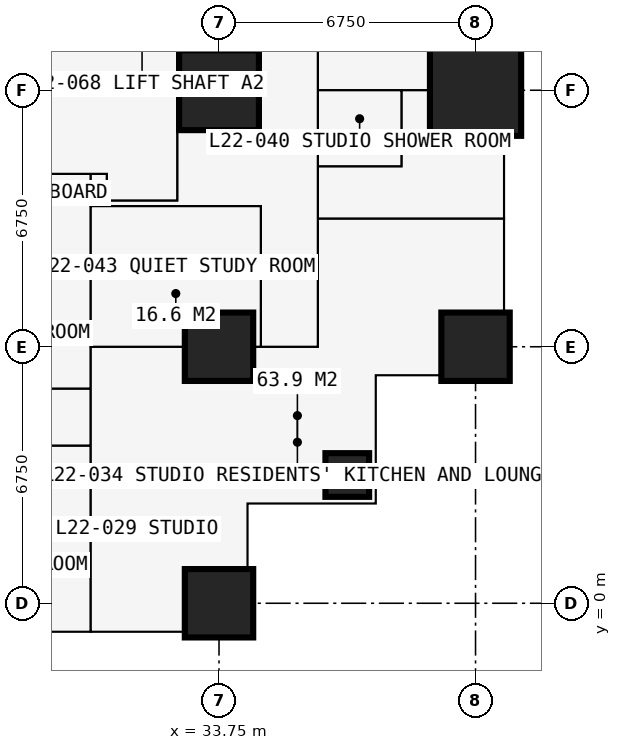
"""IFC4 building model, lengths in metres.
Left out: names, types, materials, properties, quantities, classifications, styles, units other than length and angle.
Written with IfcOpenShell. Run it as: python <this file> out.ifc"""

import sys

from ifc_helpers import new_model, si_unit, direction, frame, frame_2d, origin, origin_2d, place, context, subcontext, project, spatial, rectangle, extrude, element, fill, save


model = new_model("IFC4")
c1 = context("Model", 3, precision=1e-05, world=origin(), true_north=direction((0.0, 1.0)))
c2 = subcontext(c1, "Body", "Model", "MODEL_VIEW")
j1 = project(units=[si_unit("LENGTHUNIT", "METRE"), si_unit("PLANEANGLEUNIT", "RADIAN")], contexts=[c1])
p1 = place(None, origin())
s1 = spatial("IfcSite", under=j1, at=p1, CompositionType="ELEMENT")
p2 = place(p1, origin())
s2 = spatial("IfcBuilding", under=s1, at=p2, CompositionType="ELEMENT")
p3 = place(p2, frame((0.0, 0.0, 83.7)))
s3 = spatial("IfcBuildingStorey", under=s2, at=p3, CompositionType="ELEMENT", Elevation=83.7)
for number, where, z_axis, x_axis in (
    (1, (33.75, 0.0, 0.0), (0.0, 0.0, 1.0), (1.0, 0.0, 0.0)),
    (2, (33.75, 6.75, 0.0), (0.0, 0.0, 1.0), (1.0, 0.0, 0.0)),
):
    element("IfcColumn", number, at=place(p3, frame(where, z_axis=z_axis, x_axis=x_axis)), inside=s3, PredefinedType="COLUMN", context=c2, shape_type="SweptSolid", body=[
        extrude(rectangle(XDim=1.8, YDim=1.8, at=origin_2d()), origin(), (0.0, 0.0, 1.0), 3.6),
    ])
p4 = place(p3, frame((33.75, 13.5, 0.0), z_axis=(0.0, 0.0, 1.0), x_axis=(1.0, 0.0, 0.0)))
e3 = element("IfcColumn", 3, at=p4, inside=s3, PredefinedType="COLUMN", context=c2, shape_type="SweptSolid", body=[
    extrude(rectangle(XDim=2.1, YDim=2.1, at=origin_2d()), origin(), (0.0, 0.0, 1.0), 3.6),
])
p5 = place(p3, frame((37.125, 3.375, 0.0), z_axis=(0.0, 0.0, 1.0), x_axis=(1.0, 0.0, 0.0)))
e4 = element("IfcColumn", 4, at=p5, inside=s3, PredefinedType="COLUMN", context=c2, shape_type="SweptSolid", body=[
    extrude(rectangle(XDim=1.15, YDim=1.15, at=origin_2d()), origin(), (0.0, 0.0, 1.0), 3.6),
])
p6 = place(p3, frame((40.5, 6.75, 0.0), z_axis=(0.0, 0.0, 1.0), x_axis=(1.0, 0.0, 0.0)))
e5 = element("IfcColumn", 5, at=p6, inside=s3, PredefinedType="COLUMN", context=c2, shape_type="SweptSolid", body=[
    extrude(rectangle(XDim=1.8, YDim=1.8, at=origin_2d()), origin(), (0.0, 0.0, 1.0), 3.6),
])
p7 = place(p3, frame((40.5, 13.5, 0.0), z_axis=(0.0, 0.0, 1.0), x_axis=(1.0, 0.0, 0.0)))
e6 = element("IfcColumn", 6, at=p7, inside=s3, PredefinedType="COLUMN", context=c2, shape_type="SweptSolid", body=[
    extrude(rectangle(XDim=2.4, YDim=2.4, at=origin_2d()), origin(), (0.0, 0.0, 1.0), 3.6),
])
p8 = place(p3, frame((34.5, -0.75, 0.0), z_axis=(0.0, 0.0, 1.0), x_axis=(0.0, 1.0, 0.0)))
e7 = element("IfcWall", 7, at=p8, inside=s3, PredefinedType="SOLIDWALL", context=c2, shape_type="SweptSolid", body=[
    extrude(rectangle(XDim=3.375, YDim=0.3, at=frame_2d((1.688, 0.0))), origin(), (0.0, 0.0, 1.0), 3.375),
])
p9 = place(p8, frame((1.833, 0.0, 0.9)))
e8 = element("IfcOpeningElement", 8, at=p9, cuts=e7, PredefinedType="OPENING", context=c2, shape_type="SweptSolid", body=[
    extrude(rectangle(XDim=1.2, YDim=1.8, at=frame_2d((0.6, 0.9))), frame((0.0, 0.16, 0.0), z_axis=(0.0, -1.0, 0.0), x_axis=(1.0, 0.0, 0.0)), (0.0, 0.0, 1.0), 0.32),
])
p10 = place(p3, frame((34.5, 2.625, 0.0), z_axis=(0.0, 0.0, 1.0), x_axis=(1.0, 0.0, 0.0)))
e9 = element("IfcWall", 9, at=p10, inside=s3, PredefinedType="SOLIDWALL", context=c2, shape_type="SweptSolid", body=[
    extrude(rectangle(XDim=3.375, YDim=0.3, at=frame_2d((1.688, 0.0))), origin(), (0.0, 0.0, 1.0), 3.375),
])
p11 = place(p10, frame((0.788, 0.0, 0.6)))
e10 = element("IfcOpeningElement", 10, at=p11, cuts=e9, PredefinedType="OPENING", context=c2, shape_type="SweptSolid", body=[
    extrude(rectangle(XDim=1.8, YDim=2.1, at=frame_2d((0.9, 1.05))), frame((0.0, 0.16, 0.0), z_axis=(0.0, -1.0, 0.0), x_axis=(1.0, 0.0, 0.0)), (0.0, 0.0, 1.0), 0.32),
])
p12 = place(p3, frame((37.875, 2.625, 0.0), z_axis=(0.0, 0.0, 1.0), x_axis=(0.0, 1.0, 0.0)))
e11 = element("IfcWall", 11, at=p12, inside=s3, PredefinedType="SOLIDWALL", context=c2, shape_type="SweptSolid", body=[
    extrude(rectangle(XDim=3.375, YDim=0.3, at=frame_2d((1.688, 0.0))), origin(), (0.0, 0.0, 1.0), 3.375),
])
p13 = place(p12, frame((0.788, 0.0, 0.6)))
e12 = element("IfcOpeningElement", 12, at=p13, cuts=e11, PredefinedType="OPENING", context=c2, shape_type="SweptSolid", body=[
    extrude(rectangle(XDim=1.8, YDim=2.1, at=frame_2d((0.9, 1.05))), frame((0.0, 0.16, 0.0), z_axis=(0.0, -1.0, 0.0), x_axis=(1.0, 0.0, 0.0)), (0.0, 0.0, 1.0), 0.32),
])
p14 = place(p3, frame((37.875, 6.0, 0.0), z_axis=(0.0, 0.0, 1.0), x_axis=(1.0, 0.0, 0.0)))
e13 = element("IfcWall", 13, at=p14, inside=s3, PredefinedType="SOLIDWALL", context=c2, shape_type="SweptSolid", body=[
    extrude(rectangle(XDim=3.375, YDim=0.3, at=frame_2d((1.688, 0.0))), origin(), (0.0, 0.0, 1.0), 3.375),
])
p15 = place(p14, frame((0.343, 0.0, 0.9)))
e14 = element("IfcOpeningElement", 14, at=p15, cuts=e13, PredefinedType="OPENING", context=c2, shape_type="SweptSolid", body=[
    extrude(rectangle(XDim=1.2, YDim=1.8, at=frame_2d((0.6, 0.9))), frame((0.0, 0.16, 0.0), z_axis=(0.0, -1.0, 0.0), x_axis=(1.0, 0.0, 0.0)), (0.0, 0.0, 1.0), 0.32),
])
p16 = place(p3, frame((6.75, 4.15, 0.0), z_axis=(0.0, 0.0, 1.0), x_axis=(1.0, 0.0, 0.0)))
e15 = element("IfcWall", 15, at=p16, inside=s3, PredefinedType="PARTITIONING", context=c2, shape_type="SweptSolid", body=[
    extrude(rectangle(XDim=23.625, YDim=0.1, at=frame_2d((11.812, 0.0))), origin(), (0.0, 0.0, 1.0), 3.375),
])
p17 = place(p16, frame((0.2, 0.0, 0.0)))
e16 = element("IfcOpeningElement", 16, at=p17, cuts=e15, PredefinedType="OPENING", context=c2, shape_type="SweptSolid", body=[
    extrude(rectangle(XDim=0.95, YDim=2.2, at=frame_2d((0.475, 1.1))), frame((0.0, 0.06, 0.0), z_axis=(0.0, -1.0, 0.0), x_axis=(1.0, 0.0, 0.0)), (0.0, 0.0, 1.0), 0.12),
])
p18 = place(p16, frame((3.625, 0.0, 0.0)))
e17 = element("IfcOpeningElement", 17, at=p18, cuts=e15, PredefinedType="OPENING", context=c2, shape_type="SweptSolid", body=[
    extrude(rectangle(XDim=0.95, YDim=2.2, at=frame_2d((0.475, 1.1))), frame((0.0, 0.06, 0.0), z_axis=(0.0, -1.0, 0.0), x_axis=(1.0, 0.0, 0.0)), (0.0, 0.0, 1.0), 0.12),
])
p19 = place(p16, frame((7.0, 0.0, 0.0)))
e18 = element("IfcOpeningElement", 18, at=p19, cuts=e15, PredefinedType="OPENING", context=c2, shape_type="SweptSolid", body=[
    extrude(rectangle(XDim=0.95, YDim=2.2, at=frame_2d((0.475, 1.1))), frame((0.0, 0.06, 0.0), z_axis=(0.0, -1.0, 0.0), x_axis=(1.0, 0.0, 0.0)), (0.0, 0.0, 1.0), 0.12),
])
p20 = place(p16, frame((10.375, 0.0, 0.0)))
e19 = element("IfcOpeningElement", 19, at=p20, cuts=e15, PredefinedType="OPENING", context=c2, shape_type="SweptSolid", body=[
    extrude(rectangle(XDim=0.95, YDim=2.2, at=frame_2d((0.475, 1.1))), frame((0.0, 0.06, 0.0), z_axis=(0.0, -1.0, 0.0), x_axis=(1.0, 0.0, 0.0)), (0.0, 0.0, 1.0), 0.12),
])
p21 = place(p16, frame((15.1, 0.0, 0.0)))
e20 = element("IfcOpeningElement", 20, at=p21, cuts=e15, PredefinedType="OPENING", context=c2, shape_type="SweptSolid", body=[
    extrude(rectangle(XDim=0.95, YDim=2.2, at=frame_2d((0.475, 1.1))), frame((0.0, 0.06, 0.0), z_axis=(0.0, -1.0, 0.0), x_axis=(1.0, 0.0, 0.0)), (0.0, 0.0, 1.0), 0.12),
])
p22 = place(p16, frame((20.5, 0.0, 0.0)))
e21 = element("IfcOpeningElement", 21, at=p22, cuts=e15, PredefinedType="OPENING", context=c2, shape_type="SweptSolid", body=[
    extrude(rectangle(XDim=0.95, YDim=2.2, at=frame_2d((0.475, 1.1))), frame((0.0, 0.06, 0.0), z_axis=(0.0, -1.0, 0.0), x_axis=(1.0, 0.0, 0.0)), (0.0, 0.0, 1.0), 0.12),
])
p23 = place(p3, frame((10.125, 11.3, 0.0), z_axis=(0.0, 0.0, 1.0), x_axis=(1.0, 0.0, 0.0)))
e22 = element("IfcWall", 22, at=p23, inside=s3, PredefinedType="PARTITIONING", context=c2, shape_type="SweptSolid", body=[
    extrude(rectangle(XDim=20.675, YDim=0.15, at=frame_2d((10.337, 0.0))), origin(), (0.0, 0.0, 1.0), 3.375),
])
p24 = place(p23, frame((8.375, 0.0, 0.0)))
e23 = element("IfcOpeningElement", 23, at=p24, cuts=e22, PredefinedType="OPENING", context=c2, shape_type="SweptSolid", body=[
    extrude(rectangle(XDim=1.0, YDim=2.2, at=frame_2d((0.5, 1.1))), frame((0.0, 0.085, 0.0), z_axis=(0.0, -1.0, 0.0), x_axis=(1.0, 0.0, 0.0)), (0.0, 0.0, 1.0), 0.17),
])
p25 = place(p23, frame((10.975, 0.0, 0.0)))
e24 = element("IfcOpeningElement", 24, at=p25, cuts=e22, PredefinedType="OPENING", context=c2, shape_type="SweptSolid", body=[
    extrude(rectangle(XDim=1.0, YDim=2.2, at=frame_2d((0.5, 1.1))), frame((0.0, 0.085, 0.0), z_axis=(0.0, -1.0, 0.0), x_axis=(1.0, 0.0, 0.0)), (0.0, 0.0, 1.0), 0.17),
])
p26 = place(p23, frame((3.925, 0.0, 0.0)))
e25 = element("IfcOpeningElement", 25, at=p26, cuts=e22, PredefinedType="OPENING", context=c2, shape_type="SweptSolid", body=[
    extrude(rectangle(XDim=0.95, YDim=2.2, at=frame_2d((0.475, 1.1))), frame((0.0, 0.085, 0.0), z_axis=(0.0, -1.0, 0.0), x_axis=(1.0, 0.0, 0.0)), (0.0, 0.0, 1.0), 0.17),
])
p27 = place(p3, frame((22.988, 5.65, 0.0), z_axis=(0.0, 0.0, 1.0), x_axis=(1.0, 0.0, 0.0)))
e26 = element("IfcWall", 26, at=p27, inside=s3, PredefinedType="PARTITIONING", context=c2, shape_type="SweptSolid", body=[
    extrude(rectangle(XDim=7.387, YDim=0.15, at=frame_2d((3.694, 0.0))), origin(), (0.0, 0.0, 1.0), 3.375),
])
p28 = place(p27, frame((2.0, 0.0, 0.0)))
e27 = element("IfcOpeningElement", 27, at=p28, cuts=e26, PredefinedType="OPENING", context=c2, shape_type="SweptSolid", body=[
    extrude(rectangle(XDim=0.95, YDim=2.2, at=frame_2d((0.475, 1.1))), frame((0.0, 0.085, 0.0), z_axis=(0.0, -1.0, 0.0), x_axis=(1.0, 0.0, 0.0)), (0.0, 0.0, 1.0), 0.17),
])
p29 = place(p3, frame((28.375, 1.95, 0.0), z_axis=(0.0, 0.0, 1.0), x_axis=(1.0, 0.0, 0.0)))
e28 = element("IfcWall", 28, at=p29, inside=s3, PredefinedType="PARTITIONING", context=c2, shape_type="SweptSolid", body=[
    extrude(rectangle(XDim=2.0, YDim=0.1, at=frame_2d((1.0, 0.0))), origin(), (0.0, 0.0, 1.0), 3.375),
])
p30 = place(p3, frame((30.375, -0.734, 0.0), z_axis=(0.0, 0.0, 1.0), x_axis=(0.0, 1.0, 0.0)))
e29 = element("IfcWall", 29, at=p30, inside=s3, PredefinedType="PARTITIONING", context=c2, shape_type="SweptSolid", body=[
    extrude(rectangle(XDim=12.034, YDim=0.15, at=frame_2d((6.017, 0.0))), origin(), (0.0, 0.0, 1.0), 3.375),
])
p31 = place(p30, frame((5.134, 0.0, 0.0)))
e30 = element("IfcOpeningElement", 30, at=p31, cuts=e29, PredefinedType="OPENING", context=c2, shape_type="SweptSolid", body=[
    extrude(rectangle(XDim=1.0, YDim=2.2, at=frame_2d((0.5, 1.1))), frame((0.0, 0.085, 0.0), z_axis=(0.0, -1.0, 0.0), x_axis=(1.0, 0.0, 0.0)), (0.0, 0.0, 1.0), 0.17),
])
p32 = place(p3, frame((30.375, 6.75, 0.0), z_axis=(0.0, 0.0, 1.0), x_axis=(1.0, 0.0, 0.0)))
e31 = element("IfcWall", 31, at=p32, inside=s3, PredefinedType="PARTITIONING", context=c2, shape_type="SweptSolid", body=[
    extrude(rectangle(XDim=5.975, YDim=0.15, at=frame_2d((2.988, 0.0))), origin(), (0.0, 0.0, 1.0), 2.877),
])
p33 = place(p3, frame((30.375, 10.45, 0.0), z_axis=(0.0, 0.0, 1.0), x_axis=(1.0, 0.0, 0.0)))
e32 = element("IfcWall", 32, at=p33, inside=s3, PredefinedType="PARTITIONING", context=c2, shape_type="SweptSolid", body=[
    extrude(rectangle(XDim=4.475, YDim=0.15, at=frame_2d((2.238, 0.0))), origin(), (0.0, 0.0, 1.0), 3.375),
])
p34 = place(p33, frame((2.35, 0.0, 0.0)))
e33 = element("IfcOpeningElement", 33, at=p34, cuts=e32, PredefinedType="OPENING", context=c2, shape_type="SweptSolid", body=[
    extrude(rectangle(XDim=0.95, YDim=2.2, at=frame_2d((0.475, 1.1))), frame((0.0, 0.085, 0.0), z_axis=(0.0, -1.0, 0.0), x_axis=(1.0, 0.0, 0.0)), (0.0, 0.0, 1.0), 0.17),
])
p35 = place(p3, frame((30.8, 10.6, 0.0), z_axis=(0.0, 0.0, 1.0), x_axis=(0.0, 1.0, 0.0)))
e34 = element("IfcWall", 34, at=p35, inside=s3, PredefinedType="PARTITIONING", context=c2, shape_type="SweptSolid", body=[
    extrude(rectangle(XDim=0.7, YDim=0.15, at=frame_2d((0.35, 0.0))), origin(), (0.0, 0.0, 1.0), 3.375),
])
p36 = place(p3, frame((30.8, 10.6, 0.0), z_axis=(0.0, 0.0, 1.0), x_axis=(1.0, 0.0, 0.0)))
e35 = element("IfcWall", 35, at=p36, inside=s3, PredefinedType="PARTITIONING", context=c2, shape_type="SweptSolid", body=[
    extrude(rectangle(XDim=1.85, YDim=0.15, at=frame_2d((0.925, 0.0))), origin(), (0.0, 0.0, 1.0), 3.375),
])
p37 = place(p3, frame((32.65, 10.6, 0.0), z_axis=(0.0, 0.0, 1.0), x_axis=(0.0, 1.0, 0.0)))
e36 = element("IfcWall", 36, at=p37, inside=s3, PredefinedType="SHEAR", context=c2, shape_type="SweptSolid", body=[
    extrude(rectangle(XDim=9.3, YDim=0.1, at=frame_2d((4.65, 0.0))), origin(), (0.0, 0.0, 1.0), 3.375),
])
p38 = place(p37, frame((0.5, 0.0, 0.0)))
e37 = element("IfcOpeningElement", 37, at=p38, cuts=e36, PredefinedType="OPENING", context=c2, shape_type="SweptSolid", body=[
    extrude(rectangle(XDim=1.0, YDim=2.2, at=frame_2d((0.5, 1.1))), frame((0.0, 0.06, 0.0), z_axis=(0.0, -1.0, 0.0), x_axis=(1.0, 0.0, 0.0)), (0.0, 0.0, 1.0), 0.12),
])
p39 = place(p3, frame((32.65, 12.55, 0.0), z_axis=(0.0, 0.0, 1.0), x_axis=(1.0, 0.0, 0.0)))
e38 = element("IfcWall", 38, at=p39, inside=s3, PredefinedType="PARTITIONING", context=c2, shape_type="SweptSolid", body=[
    extrude(rectangle(XDim=2.2, YDim=0.15, at=frame_2d((1.1, 0.0))), origin(), (0.0, 0.0, 1.0), 3.375),
])
p40 = place(p3, frame((34.85, 6.75, 0.0), z_axis=(0.0, 0.0, 1.0), x_axis=(0.0, 1.0, 0.0)))
e39 = element("IfcWall", 39, at=p40, inside=s3, PredefinedType="PARTITIONING", context=c2, shape_type="SweptSolid", body=[
    extrude(rectangle(XDim=3.7, YDim=0.15, at=frame_2d((1.85, 0.0))), origin(), (0.0, 0.0, 1.0), 3.375),
])
p41 = place(p3, frame((34.85, 12.55, 0.0), z_axis=(0.0, 0.0, 1.0), x_axis=(0.0, 1.0, 0.0)))
e40 = element("IfcWall", 40, at=p41, inside=s3, PredefinedType="PARTITIONING", context=c2, shape_type="SweptSolid", body=[
    extrude(rectangle(XDim=17.825, YDim=0.15, at=frame_2d((8.913, 0.0))), origin(), (0.0, 0.0, 1.0), 3.375),
])
p42 = place(p41, frame((8.6, 0.0, 0.0)))
e41 = element("IfcOpeningElement", 41, at=p42, cuts=e40, PredefinedType="OPENING", context=c2, shape_type="SweptSolid", body=[
    extrude(rectangle(XDim=0.95, YDim=2.2, at=frame_2d((0.475, 1.1))), frame((0.0, 0.085, 0.0), z_axis=(0.0, -1.0, 0.0), x_axis=(1.0, 0.0, 0.0)), (0.0, 0.0, 1.0), 0.17),
])
p43 = place(p3, frame((36.35, 6.75, 0.0), z_axis=(0.0, 0.0, 1.0), x_axis=(0.0, 1.0, 0.0)))
e42 = element("IfcWall", 42, at=p43, inside=s3, PredefinedType="PARTITIONING", context=c2, shape_type="SweptSolid", body=[
    extrude(rectangle(XDim=20.25, YDim=0.15, at=frame_2d((10.125, 0.0))), origin(), (0.0, 0.0, 1.0), 3.375),
])
p44 = place(p43, frame((15.1, 0.0, 0.0)))
e43 = element("IfcOpeningElement", 43, at=p44, cuts=e42, PredefinedType="OPENING", context=c2, shape_type="SweptSolid", body=[
    extrude(rectangle(XDim=0.95, YDim=2.2, at=frame_2d((0.475, 1.1))), frame((0.0, 0.085, 0.0), z_axis=(0.0, -1.0, 0.0), x_axis=(1.0, 0.0, 0.0)), (0.0, 0.0, 1.0), 0.17),
])
p45 = place(p43, frame((8.35, 0.0, 0.0)))
e44 = element("IfcOpeningElement", 44, at=p45, cuts=e42, PredefinedType="OPENING", context=c2, shape_type="SweptSolid", body=[
    extrude(rectangle(XDim=0.95, YDim=2.2, at=frame_2d((0.475, 1.1))), frame((0.0, 0.085, 0.0), z_axis=(0.0, -1.0, 0.0), x_axis=(1.0, 0.0, 0.0)), (0.0, 0.0, 1.0), 0.17),
])
p46 = place(p43, frame((3.575, 0.0, 0.0)))
e45 = element("IfcOpeningElement", 45, at=p46, cuts=e42, PredefinedType="OPENING", context=c2, shape_type="SweptSolid", body=[
    extrude(rectangle(XDim=0.95, YDim=2.2, at=frame_2d((0.475, 1.1))), frame((0.0, 0.085, 0.0), z_axis=(0.0, -1.0, 0.0), x_axis=(1.0, 0.0, 0.0)), (0.0, 0.0, 1.0), 0.17),
])
p47 = place(p3, frame((36.35, 10.125, 0.0), z_axis=(0.0, 0.0, 1.0), x_axis=(1.0, 0.0, 0.0)))
e46 = element("IfcWall", 46, at=p47, inside=s3, PredefinedType="PARTITIONING", context=c2, shape_type="SweptSolid", body=[
    extrude(rectangle(XDim=4.884, YDim=0.15, at=frame_2d((2.442, 0.0))), origin(), (0.0, 0.0, 1.0), 3.375),
])
p48 = place(p3, frame((36.35, 11.5, 0.0), z_axis=(0.0, 0.0, 1.0), x_axis=(1.0, 0.0, 0.0)))
e47 = element("IfcWall", 47, at=p48, inside=s3, PredefinedType="PARTITIONING", context=c2, shape_type="SweptSolid", body=[
    extrude(rectangle(XDim=2.2, YDim=0.1, at=frame_2d((1.1, 0.0))), origin(), (0.0, 0.0, 1.0), 3.375),
])
p49 = place(p3, frame((36.35, 13.5, 0.0), z_axis=(0.0, 0.0, 1.0), x_axis=(1.0, 0.0, 0.0)))
e48 = element("IfcWall", 48, at=p49, inside=s3, PredefinedType="PARTITIONING", context=c2, shape_type="SweptSolid", body=[
    extrude(rectangle(XDim=4.884, YDim=0.175, at=frame_2d((2.442, 0.0))), origin(), (0.0, 0.0, 1.0), 2.61),
])
p50 = place(p49, frame((0.65, 0.0, 0.0)))
e49 = element("IfcOpeningElement", 49, at=p50, cuts=e48, PredefinedType="OPENING", context=c2, shape_type="SweptSolid", body=[
    extrude(rectangle(XDim=0.9, YDim=2.2, at=frame_2d((0.45, 1.1))), frame((0.0, 0.097, 0.0), z_axis=(0.0, -1.0, 0.0), x_axis=(1.0, 0.0, 0.0)), (0.0, 0.0, 1.0), 0.195),
])
p51 = place(p3, frame((38.55, 11.5, 0.0), z_axis=(0.0, 0.0, 1.0), x_axis=(0.0, 1.0, 0.0)))
e50 = element("IfcWall", 50, at=p51, inside=s3, PredefinedType="PARTITIONING", context=c2, shape_type="SweptSolid", body=[
    extrude(rectangle(XDim=2.0, YDim=0.1, at=frame_2d((1.0, 0.0))), origin(), (0.0, 0.0, 1.0), 3.375),
])
p52 = place(p9, origin())
e51 = element("IfcWindow", 51, at=p52, inside=s3, PartitioningType="SINGLE_PANEL", PredefinedType="WINDOW", context=c2, shape_type="SweptSolid", body=[
    extrude(rectangle(XDim=1.2, YDim=1.8, at=frame_2d((0.6, 0.9))), frame((0.0, 0.03, 0.0), z_axis=(0.0, -1.0, 0.0), x_axis=(1.0, 0.0, 0.0)), (0.0, 0.0, 1.0), 0.06),
])
fill(e8, e51)
p53 = place(p11, origin())
e52 = element("IfcWindow", 52, at=p53, inside=s3, PartitioningType="SINGLE_PANEL", PredefinedType="WINDOW", context=c2, shape_type="SweptSolid", body=[
    extrude(rectangle(XDim=1.8, YDim=2.1, at=frame_2d((0.9, 1.05))), frame((0.0, 0.03, 0.0), z_axis=(0.0, -1.0, 0.0), x_axis=(1.0, 0.0, 0.0)), (0.0, 0.0, 1.0), 0.06),
])
fill(e10, e52)
p54 = place(p13, origin())
e53 = element("IfcWindow", 53, at=p54, inside=s3, PartitioningType="SINGLE_PANEL", PredefinedType="WINDOW", context=c2, shape_type="SweptSolid", body=[
    extrude(rectangle(XDim=1.8, YDim=2.1, at=frame_2d((0.9, 1.05))), frame((0.0, 0.03, 0.0), z_axis=(0.0, -1.0, 0.0), x_axis=(1.0, 0.0, 0.0)), (0.0, 0.0, 1.0), 0.06),
])
fill(e12, e53)
p55 = place(p15, origin())
e54 = element("IfcWindow", 54, at=p55, inside=s3, PartitioningType="SINGLE_PANEL", PredefinedType="WINDOW", context=c2, shape_type="SweptSolid", body=[
    extrude(rectangle(XDim=1.2, YDim=1.8, at=frame_2d((0.6, 0.9))), frame((0.0, 0.03, 0.0), z_axis=(0.0, -1.0, 0.0), x_axis=(1.0, 0.0, 0.0)), (0.0, 0.0, 1.0), 0.06),
])
fill(e14, e54)
p56 = place(p31, origin())
e55 = element("IfcDoor", 55, at=p56, inside=s3, OperationType="SINGLE_SWING_LEFT", PredefinedType="DOOR", context=c2, shape_type="SweptSolid", body=[
    extrude(rectangle(XDim=1.0, YDim=2.2, at=frame_2d((0.5, 1.1))), frame((0.0, 0.025, 0.0), z_axis=(0.0, -1.0, 0.0), x_axis=(1.0, 0.0, 0.0)), (0.0, 0.0, 1.0), 0.05),
])
fill(e30, e55)
p57 = place(p46, origin())
e56 = element("IfcDoor", 56, at=p57, inside=s3, OperationType="SINGLE_SWING_LEFT", PredefinedType="DOOR", context=c2, shape_type="SweptSolid", body=[
    extrude(rectangle(XDim=0.95, YDim=2.2, at=frame_2d((0.475, 1.1))), frame((0.0, 0.025, 0.0), z_axis=(0.0, -1.0, 0.0), x_axis=(1.0, 0.0, 0.0)), (0.0, 0.0, 1.0), 0.05),
])
fill(e45, e56)
p58 = place(p50, origin())
e57 = element("IfcDoor", 57, at=p58, inside=s3, OperationType="SINGLE_SWING_RIGHT", PredefinedType="DOOR", context=c2, shape_type="SweptSolid", body=[
    extrude(rectangle(XDim=0.9, YDim=2.2, at=frame_2d((0.45, 1.1))), frame((0.0, 0.025, 0.0), z_axis=(0.0, -1.0, 0.0), x_axis=(1.0, 0.0, 0.0)), (0.0, 0.0, 1.0), 0.05),
])
fill(e49, e57)
p59 = place(p38, origin())
e58 = element("IfcDoor", 58, at=p59, inside=s3, OperationType="SINGLE_SWING_LEFT", PredefinedType="DOOR", context=c2, shape_type="SweptSolid", body=[
    extrude(rectangle(XDim=1.0, YDim=2.2, at=frame_2d((0.5, 1.1))), frame((0.0, 0.025, 0.0), z_axis=(0.0, -1.0, 0.0), x_axis=(1.0, 0.0, 0.0)), (0.0, 0.0, 1.0), 0.05),
])
fill(e37, e58)
p60 = place(p34, origin())
e59 = element("IfcDoor", 59, at=p60, inside=s3, OperationType="SINGLE_SWING_LEFT", PredefinedType="DOOR", context=c2, shape_type="SweptSolid", body=[
    extrude(rectangle(XDim=0.95, YDim=2.2, at=frame_2d((0.475, 1.1))), frame((0.0, 0.025, 0.0), z_axis=(0.0, -1.0, 0.0), x_axis=(1.0, 0.0, 0.0)), (0.0, 0.0, 1.0), 0.05),
])
fill(e33, e59)
save(model, sys.argv[1])
